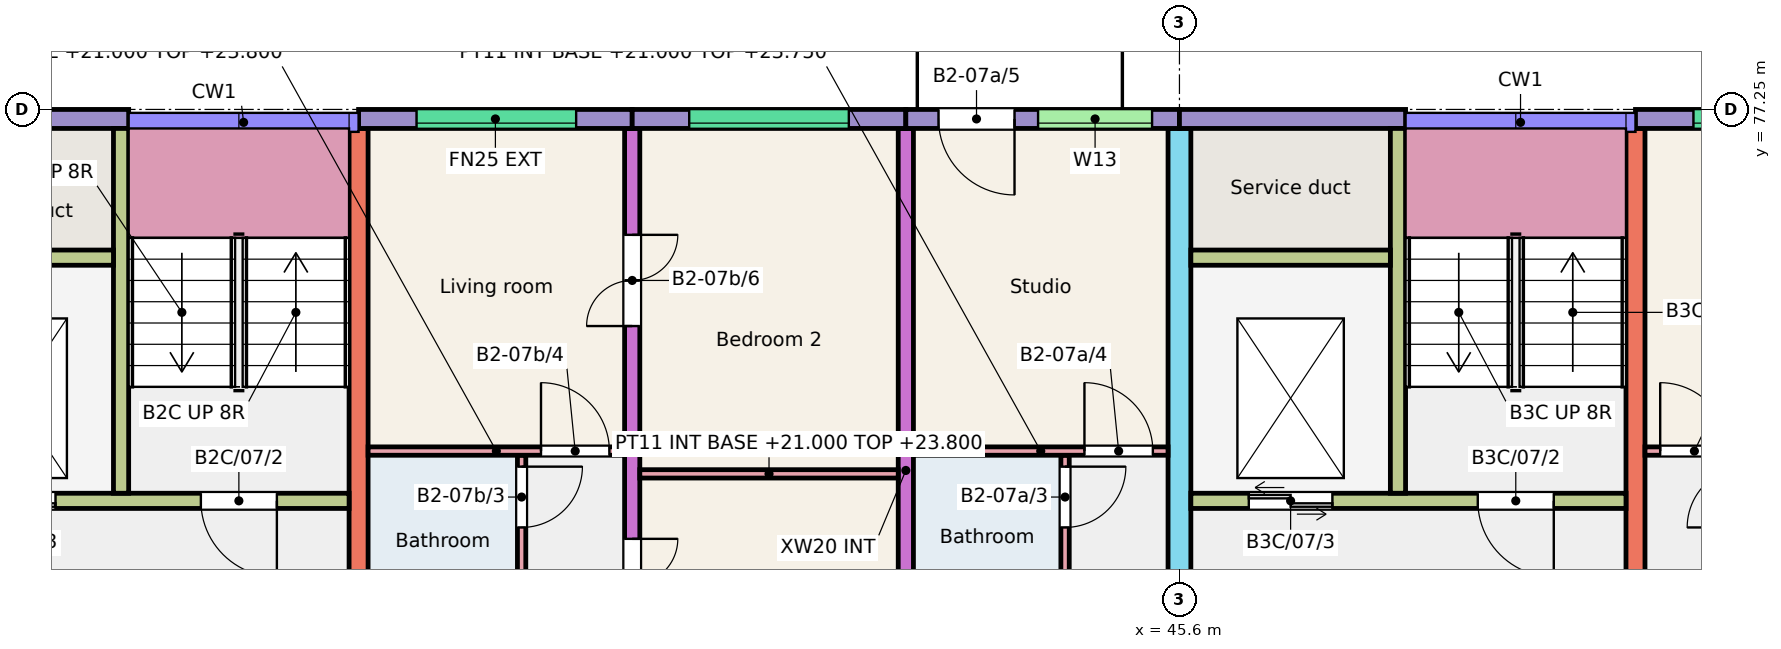
"""IFC4 building model, lengths in metres.
Left out: names, types, materials, properties, quantities, classifications, styles, units other than length and angle.
Written with IfcOpenShell. Run it as: python <this file> out.ifc"""

import sys

from ifc_helpers import new_model, si_unit, direction, frame, frame_2d, origin, place, context, subcontext, project, spatial, rectangle, extrude, element, fill, save


model = new_model("IFC4")
c1 = context("Model", 3, precision=1e-05, world=origin(), true_north=direction((0.0, 1.0)))
c2 = subcontext(c1, "Body", "Model", "MODEL_VIEW")
j1 = project(units=[si_unit("LENGTHUNIT", "METRE"), si_unit("PLANEANGLEUNIT", "RADIAN")], contexts=[c1])
p1 = place(None, origin())
s1 = spatial("IfcSite", under=j1, at=p1, CompositionType="ELEMENT")
p2 = place(p1, origin())
s2 = spatial("IfcBuilding", under=s1, at=p2, CompositionType="ELEMENT")
p3 = place(p2, frame((0.0, 0.0, 21.0)))
s3 = spatial("IfcBuildingStorey", under=s2, at=p3, CompositionType="ELEMENT", Elevation=21.0)
p4 = place(p3, frame((34.8, 68.0, 0.0), z_axis=(0.0, 0.0, 1.0), x_axis=(0.0, 1.0, 0.0)))
e1 = element("IfcWall", 1, at=p4, inside=s3, PredefinedType="SHEAR", context=c2, shape_type="SweptSolid", body=[
    extrude(rectangle(XDim=9.0, YDim=0.25, at=frame_2d((4.5, 0.0))), origin(), (0.0, 0.0, 1.0), 3.0),
])
p5 = place(p3, frame((38.4, 68.0, 0.0), z_axis=(0.0, 0.0, 1.0), x_axis=(0.0, 1.0, 0.0)))
e2 = element("IfcWall", 2, at=p5, inside=s3, PredefinedType="SHEAR", context=c2, shape_type="SweptSolid", body=[
    extrude(rectangle(XDim=9.0, YDim=0.2, at=frame_2d((4.5, 0.0))), origin(), (0.0, 0.0, 1.0), 3.0),
])
p6 = place(p5, frame((2.4, 0.0, 0.0)))
e3 = element("IfcOpeningElement", 3, at=p6, cuts=e2, PredefinedType="OPENING", context=c2, shape_type="SweptSolid", body=[
    extrude(rectangle(XDim=1.2, YDim=2.1, at=frame_2d((0.6, 1.05))), frame((0.0, 0.11, 0.0), z_axis=(0.0, -1.0, 0.0), x_axis=(1.0, 0.0, 0.0)), (0.0, 0.0, 1.0), 0.22),
])
p7 = place(p5, frame((6.4, 0.0, 0.0)))
e4 = element("IfcOpeningElement", 4, at=p7, cuts=e2, PredefinedType="OPENING", context=c2, shape_type="SweptSolid", body=[
    extrude(rectangle(XDim=1.2, YDim=2.1, at=frame_2d((0.6, 1.05))), frame((0.0, 0.11, 0.0), z_axis=(0.0, -1.0, 0.0), x_axis=(1.0, 0.0, 0.0)), (0.0, 0.0, 1.0), 0.22),
])
p8 = place(p3, frame((42.0, 68.0, 0.0), z_axis=(0.0, 0.0, 1.0), x_axis=(0.0, 1.0, 0.0)))
e5 = element("IfcWall", 5, at=p8, inside=s3, PredefinedType="SHEAR", context=c2, shape_type="SweptSolid", body=[
    extrude(rectangle(XDim=9.0, YDim=0.2, at=frame_2d((4.5, 0.0))), origin(), (0.0, 0.0, 1.0), 3.0),
])
p9 = place(p3, frame((45.6, 66.0, 0.0), z_axis=(0.0, 0.0, 1.0), x_axis=(0.0, 1.0, 0.0)))
e6 = element("IfcWall", 6, at=p9, inside=s3, PredefinedType="SHEAR", context=c2, shape_type="SweptSolid", body=[
    extrude(rectangle(XDim=11.0, YDim=0.3, at=frame_2d((5.5, 0.0))), origin(), (0.0, 0.0, 1.0), 3.0),
])
p10 = place(p9, frame((0.3, 0.0, 0.0)))
e7 = element("IfcOpeningElement", 7, at=p10, cuts=e6, PredefinedType="OPENING", context=c2, shape_type="SweptSolid", body=[
    extrude(rectangle(XDim=1.2, YDim=2.1, at=frame_2d((0.6, 1.05))), frame((0.0, 0.16, 0.0), z_axis=(0.0, -1.0, 0.0), x_axis=(1.0, 0.0, 0.0)), (0.0, 0.0, 1.0), 0.32),
])
p11 = place(p3, frame((51.6, 68.0, 0.0), z_axis=(0.0, 0.0, 1.0), x_axis=(0.0, 1.0, 0.0)))
e8 = element("IfcWall", 8, at=p11, inside=s3, PredefinedType="SHEAR", context=c2, shape_type="SweptSolid", body=[
    extrude(rectangle(XDim=9.0, YDim=0.25, at=frame_2d((4.5, 0.0))), origin(), (0.0, 0.0, 1.0), 3.0),
])
p12 = place(p3, frame((28.8, 77.125, 0.0), z_axis=(0.0, 0.0, 1.0), x_axis=(1.0, 0.0, 0.0)))
e9 = element("IfcWall", 9, at=p12, inside=s3, PredefinedType="SOLIDWALL", context=c2, shape_type="SweptSolid", body=[
    extrude(rectangle(XDim=2.975, YDim=0.25, at=frame_2d((1.487, 0.0))), origin(), (0.0, 0.0, 1.0), 3.0),
])
p13 = place(p3, frame((28.95, 72.1, 0.0), z_axis=(0.0, 0.0, 1.0), x_axis=(1.0, 0.0, 0.0)))
e10 = element("IfcWall", 10, at=p13, inside=s3, PredefinedType="SHEAR", context=c2, shape_type="SweptSolid", body=[
    extrude(rectangle(XDim=5.725, YDim=0.2, at=frame_2d((2.863, 0.0))), origin(), (0.0, 0.0, 1.0), 3.0),
])
p14 = place(p13, frame((3.775, 0.0, 0.0)))
e11 = element("IfcOpeningElement", 11, at=p14, cuts=e10, PredefinedType="OPENING", context=c2, shape_type="SweptSolid", body=[
    extrude(rectangle(XDim=1.0, YDim=2.1, at=frame_2d((0.5, 1.05))), frame((0.0, 0.11, 0.0), z_axis=(0.0, -1.0, 0.0), x_axis=(1.0, 0.0, 0.0)), (0.0, 0.0, 1.0), 0.22),
])
p15 = place(p13, frame((0.762, 0.0, 0.0)))
e12 = element("IfcOpeningElement", 12, at=p15, cuts=e10, PredefinedType="OPENING", context=c2, shape_type="SweptSolid", body=[
    extrude(rectangle(XDim=1.1, YDim=2.1, at=frame_2d((0.55, 1.05))), frame((0.0, 0.11, 0.0), z_axis=(0.0, -1.0, 0.0), x_axis=(1.0, 0.0, 0.0)), (0.0, 0.0, 1.0), 0.22),
])
p16 = place(p3, frame((31.675, 72.2, 0.0), z_axis=(0.0, 0.0, 1.0), x_axis=(0.0, 1.0, 0.0)))
e13 = element("IfcWall", 13, at=p16, inside=s3, PredefinedType="SHEAR", context=c2, shape_type="SweptSolid", body=[
    extrude(rectangle(XDim=4.8, YDim=0.2, at=frame_2d((2.4, 0.0))), origin(), (0.0, 0.0, 1.0), 3.0),
])
p17 = place(p3, frame((28.95, 75.3, 0.0), z_axis=(0.0, 0.0, 1.0), x_axis=(1.0, 0.0, 0.0)))
e14 = element("IfcWall", 14, at=p17, inside=s3, PredefinedType="SHEAR", context=c2, shape_type="SweptSolid", body=[
    extrude(rectangle(XDim=2.625, YDim=0.2, at=frame_2d((1.312, 0.0))), origin(), (0.0, 0.0, 1.0), 3.0),
])
p18 = place(p3, frame((34.8, 77.125, 0.0), z_axis=(0.0, 0.0, 1.0), x_axis=(1.0, 0.0, 0.0)))
e15 = element("IfcWall", 15, at=p18, inside=s3, PredefinedType="SOLIDWALL", context=c2, shape_type="SweptSolid", body=[
    extrude(rectangle(XDim=3.6, YDim=0.25, at=frame_2d((1.8, 0.0))), origin(), (0.0, 0.0, 1.0), 3.0),
])
p19 = place(p18, frame((0.762, 0.0, 1.2)))
e16 = element("IfcOpeningElement", 16, at=p19, cuts=e15, PredefinedType="OPENING", context=c2, shape_type="SweptSolid", body=[
    extrude(rectangle(XDim=2.1, YDim=1.2, at=frame_2d((1.05, 0.6))), frame((0.0, 0.135, 0.0), z_axis=(0.0, -1.0, 0.0), x_axis=(1.0, 0.0, 0.0)), (0.0, 0.0, 1.0), 0.27),
])
p20 = place(p3, frame((38.4, 77.125, 0.0), z_axis=(0.0, 0.0, 1.0), x_axis=(1.0, 0.0, 0.0)))
e17 = element("IfcWall", 17, at=p20, inside=s3, PredefinedType="SOLIDWALL", context=c2, shape_type="SweptSolid", body=[
    extrude(rectangle(XDim=3.6, YDim=0.25, at=frame_2d((1.8, 0.0))), origin(), (0.0, 0.0, 1.0), 3.0),
])
p21 = place(p20, frame((0.75, 0.0, 1.2)))
e18 = element("IfcOpeningElement", 18, at=p21, cuts=e17, PredefinedType="OPENING", context=c2, shape_type="SweptSolid", body=[
    extrude(rectangle(XDim=2.1, YDim=1.2, at=frame_2d((1.05, 0.6))), frame((0.0, 0.135, 0.0), z_axis=(0.0, -1.0, 0.0), x_axis=(1.0, 0.0, 0.0)), (0.0, 0.0, 1.0), 0.27),
])
p22 = place(p3, frame((42.0, 77.125, 0.0), z_axis=(0.0, 0.0, 1.0), x_axis=(1.0, 0.0, 0.0)))
e19 = element("IfcWall", 19, at=p22, inside=s3, PredefinedType="SOLIDWALL", context=c2, shape_type="SweptSolid", body=[
    extrude(rectangle(XDim=3.6, YDim=0.25, at=frame_2d((1.8, 0.0))), origin(), (0.0, 0.0, 1.0), 3.0),
])
p23 = place(p22, frame((1.74, 0.0, 1.2)))
e20 = element("IfcOpeningElement", 20, at=p23, cuts=e19, PredefinedType="OPENING", context=c2, shape_type="SweptSolid", body=[
    extrude(rectangle(XDim=1.5, YDim=1.2, at=frame_2d((0.75, 0.6))), frame((0.0, 0.135, 0.0), z_axis=(0.0, -1.0, 0.0), x_axis=(1.0, 0.0, 0.0)), (0.0, 0.0, 1.0), 0.27),
])
p24 = place(p22, frame((0.43, 0.0, 0.0)))
e21 = element("IfcOpeningElement", 21, at=p24, cuts=e19, PredefinedType="OPENING", context=c2, shape_type="SweptSolid", body=[
    extrude(rectangle(XDim=1.0, YDim=2.1, at=frame_2d((0.5, 1.05))), frame((0.0, 0.135, 0.0), z_axis=(0.0, -1.0, 0.0), x_axis=(1.0, 0.0, 0.0)), (0.0, 0.0, 1.0), 0.27),
])
p25 = place(p3, frame((45.6, 77.125, 0.0), z_axis=(0.0, 0.0, 1.0), x_axis=(1.0, 0.0, 0.0)))
e22 = element("IfcWall", 22, at=p25, inside=s3, PredefinedType="SOLIDWALL", context=c2, shape_type="SweptSolid", body=[
    extrude(rectangle(XDim=2.975, YDim=0.25, at=frame_2d((1.487, 0.0))), origin(), (0.0, 0.0, 1.0), 3.0),
])
p26 = place(p3, frame((45.75, 72.1, 0.0), z_axis=(0.0, 0.0, 1.0), x_axis=(1.0, 0.0, 0.0)))
e23 = element("IfcWall", 23, at=p26, inside=s3, PredefinedType="SHEAR", context=c2, shape_type="SweptSolid", body=[
    extrude(rectangle(XDim=5.725, YDim=0.2, at=frame_2d((2.863, 0.0))), origin(), (0.0, 0.0, 1.0), 3.0),
])
p27 = place(p26, frame((3.775, 0.0, 0.0)))
e24 = element("IfcOpeningElement", 24, at=p27, cuts=e23, PredefinedType="OPENING", context=c2, shape_type="SweptSolid", body=[
    extrude(rectangle(XDim=1.0, YDim=2.1, at=frame_2d((0.5, 1.05))), frame((0.0, 0.11, 0.0), z_axis=(0.0, -1.0, 0.0), x_axis=(1.0, 0.0, 0.0)), (0.0, 0.0, 1.0), 0.22),
])
p28 = place(p26, frame((0.762, 0.0, 0.0)))
e25 = element("IfcOpeningElement", 25, at=p28, cuts=e23, PredefinedType="OPENING", context=c2, shape_type="SweptSolid", body=[
    extrude(rectangle(XDim=1.1, YDim=2.1, at=frame_2d((0.55, 1.05))), frame((0.0, 0.11, 0.0), z_axis=(0.0, -1.0, 0.0), x_axis=(1.0, 0.0, 0.0)), (0.0, 0.0, 1.0), 0.22),
])
p29 = place(p3, frame((48.475, 72.2, 0.0), z_axis=(0.0, 0.0, 1.0), x_axis=(0.0, 1.0, 0.0)))
e26 = element("IfcWall", 26, at=p29, inside=s3, PredefinedType="SHEAR", context=c2, shape_type="SweptSolid", body=[
    extrude(rectangle(XDim=4.8, YDim=0.2, at=frame_2d((2.4, 0.0))), origin(), (0.0, 0.0, 1.0), 3.0),
])
p30 = place(p3, frame((45.75, 75.3, 0.0), z_axis=(0.0, 0.0, 1.0), x_axis=(1.0, 0.0, 0.0)))
e27 = element("IfcWall", 27, at=p30, inside=s3, PredefinedType="SHEAR", context=c2, shape_type="SweptSolid", body=[
    extrude(rectangle(XDim=2.625, YDim=0.2, at=frame_2d((1.312, 0.0))), origin(), (0.0, 0.0, 1.0), 3.0),
])
p31 = place(p3, frame((51.6, 77.125, 0.0), z_axis=(0.0, 0.0, 1.0), x_axis=(1.0, 0.0, 0.0)))
e28 = element("IfcWall", 28, at=p31, inside=s3, PredefinedType="SOLIDWALL", context=c2, shape_type="SweptSolid", body=[
    extrude(rectangle(XDim=3.6, YDim=0.25, at=frame_2d((1.8, 0.0))), origin(), (0.0, 0.0, 1.0), 3.0),
])
p32 = place(p31, frame((0.762, 0.0, 1.2)))
e29 = element("IfcOpeningElement", 29, at=p32, cuts=e28, PredefinedType="OPENING", context=c2, shape_type="SweptSolid", body=[
    extrude(rectangle(XDim=2.1, YDim=1.2, at=frame_2d((1.05, 0.6))), frame((0.0, 0.135, 0.0), z_axis=(0.0, -1.0, 0.0), x_axis=(1.0, 0.0, 0.0)), (0.0, 0.0, 1.0), 0.27),
])
p33 = place(p3, frame((44.095, 68.0, 0.0), z_axis=(0.0, 0.0, 1.0), x_axis=(0.0, 1.0, 0.0)))
e30 = element("IfcWall", 30, at=p33, inside=s3, PredefinedType="PARTITIONING", context=c2, shape_type="SweptSolid", body=[
    extrude(rectangle(XDim=4.7, YDim=0.11, at=frame_2d((2.35, 0.0))), origin(), (0.0, 0.0, 1.0), 2.75),
])
p34 = place(p33, frame((0.2, 0.0, 0.0)))
e31 = element("IfcOpeningElement", 31, at=p34, cuts=e30, PredefinedType="OPENING", context=c2, shape_type="SweptSolid", body=[
    extrude(rectangle(XDim=0.8, YDim=2.1, at=frame_2d((0.4, 1.05))), frame((0.0, 0.065, 0.0), z_axis=(0.0, -1.0, 0.0), x_axis=(1.0, 0.0, 0.0)), (0.0, 0.0, 1.0), 0.13),
])
p35 = place(p33, frame((3.75, 0.0, 0.0)))
e32 = element("IfcOpeningElement", 32, at=p35, cuts=e30, PredefinedType="OPENING", context=c2, shape_type="SweptSolid", body=[
    extrude(rectangle(XDim=0.8, YDim=2.1, at=frame_2d((0.4, 1.05))), frame((0.0, 0.065, 0.0), z_axis=(0.0, -1.0, 0.0), x_axis=(1.0, 0.0, 0.0)), (0.0, 0.0, 1.0), 0.13),
])
p36 = place(p3, frame((42.1, 72.755, 0.0), z_axis=(0.0, 0.0, 1.0), x_axis=(1.0, 0.0, 0.0)))
e33 = element("IfcWall", 33, at=p36, inside=s3, PredefinedType="PARTITIONING", context=c2, shape_type="SweptSolid", body=[
    extrude(rectangle(XDim=3.35, YDim=0.11, at=frame_2d((1.675, 0.0))), origin(), (0.0, 0.0, 1.0), 2.75),
])
p37 = place(p36, frame((2.25, 0.0, 0.0)))
e34 = element("IfcOpeningElement", 34, at=p37, cuts=e33, PredefinedType="OPENING", context=c2, shape_type="SweptSolid", body=[
    extrude(rectangle(XDim=0.9, YDim=2.1, at=frame_2d((0.45, 1.05))), frame((0.0, 0.065, 0.0), z_axis=(0.0, -1.0, 0.0), x_axis=(1.0, 0.0, 0.0)), (0.0, 0.0, 1.0), 0.13),
])
p38 = place(p3, frame((36.945, 68.0, 0.0), z_axis=(0.0, 0.0, 1.0), x_axis=(0.0, 1.0, 0.0)))
e35 = element("IfcWall", 35, at=p38, inside=s3, PredefinedType="PARTITIONING", context=c2, shape_type="SweptSolid", body=[
    extrude(rectangle(XDim=4.7, YDim=0.11, at=frame_2d((2.35, 0.0))), origin(), (0.0, 0.0, 1.0), 2.8),
])
p39 = place(p38, frame((0.2, 0.0, 0.0)))
e36 = element("IfcOpeningElement", 36, at=p39, cuts=e35, PredefinedType="OPENING", context=c2, shape_type="SweptSolid", body=[
    extrude(rectangle(XDim=0.8, YDim=2.1, at=frame_2d((0.4, 1.05))), frame((0.0, 0.065, 0.0), z_axis=(0.0, -1.0, 0.0), x_axis=(1.0, 0.0, 0.0)), (0.0, 0.0, 1.0), 0.13),
])
p40 = place(p38, frame((3.75, 0.0, 0.0)))
e37 = element("IfcOpeningElement", 37, at=p40, cuts=e35, PredefinedType="OPENING", context=c2, shape_type="SweptSolid", body=[
    extrude(rectangle(XDim=0.8, YDim=2.1, at=frame_2d((0.4, 1.05))), frame((0.0, 0.065, 0.0), z_axis=(0.0, -1.0, 0.0), x_axis=(1.0, 0.0, 0.0)), (0.0, 0.0, 1.0), 0.13),
])
p41 = place(p3, frame((34.925, 72.755, 0.0), z_axis=(0.0, 0.0, 1.0), x_axis=(1.0, 0.0, 0.0)))
e38 = element("IfcWall", 38, at=p41, inside=s3, PredefinedType="PARTITIONING", context=c2, shape_type="SweptSolid", body=[
    extrude(rectangle(XDim=3.375, YDim=0.11, at=frame_2d((1.688, 0.0))), origin(), (0.0, 0.0, 1.0), 2.8),
])
p42 = place(p41, frame((2.275, 0.0, 0.0)))
e39 = element("IfcOpeningElement", 39, at=p42, cuts=e38, PredefinedType="OPENING", context=c2, shape_type="SweptSolid", body=[
    extrude(rectangle(XDim=0.9, YDim=2.1, at=frame_2d((0.45, 1.05))), frame((0.0, 0.065, 0.0), z_axis=(0.0, -1.0, 0.0), x_axis=(1.0, 0.0, 0.0)), (0.0, 0.0, 1.0), 0.13),
])
p43 = place(p3, frame((38.5, 72.455, 0.0), z_axis=(0.0, 0.0, 1.0), x_axis=(1.0, 0.0, 0.0)))
e40 = element("IfcWall", 40, at=p43, inside=s3, PredefinedType="PARTITIONING", context=c2, shape_type="SweptSolid", body=[
    extrude(rectangle(XDim=3.4, YDim=0.11, at=frame_2d((1.7, 0.0))), origin(), (0.0, 0.0, 1.0), 2.8),
])
p44 = place(p3, frame((51.725, 72.755, 0.0), z_axis=(0.0, 0.0, 1.0), x_axis=(1.0, 0.0, 0.0)))
e41 = element("IfcWall", 41, at=p44, inside=s3, PredefinedType="PARTITIONING", context=c2, shape_type="SweptSolid", body=[
    extrude(rectangle(XDim=3.375, YDim=0.11, at=frame_2d((1.688, 0.0))), origin(), (0.0, 0.0, 1.0), 2.75),
])
p45 = place(p44, frame((0.2, 0.0, 0.0)))
e42 = element("IfcOpeningElement", 42, at=p45, cuts=e41, PredefinedType="OPENING", context=c2, shape_type="SweptSolid", body=[
    extrude(rectangle(XDim=0.9, YDim=2.1, at=frame_2d((0.45, 1.05))), frame((0.0, 0.065, 0.0), z_axis=(0.0, -1.0, 0.0), x_axis=(1.0, 0.0, 0.0)), (0.0, 0.0, 1.0), 0.13),
])
p46 = place(p23, origin())
e43 = element("IfcWindow", 43, at=p46, inside=s3, PartitioningType="SINGLE_PANEL", PredefinedType="WINDOW", context=c2, shape_type="SweptSolid", body=[
    extrude(rectangle(XDim=1.5, YDim=1.2, at=frame_2d((0.75, 0.6))), frame((0.0, -0.025, 0.0), z_axis=(0.0, -1.0, 0.0), x_axis=(1.0, 0.0, 0.0)), (0.0, 0.0, 1.0), 0.06),
])
fill(e20, e43)
p47 = place(p21, origin())
e44 = element("IfcWindow", 44, at=p47, inside=s3, PartitioningType="SINGLE_PANEL", PredefinedType="WINDOW", context=c2, shape_type="SweptSolid", body=[
    extrude(rectangle(XDim=2.1, YDim=1.2, at=frame_2d((1.05, 0.6))), frame((0.0, -0.025, 0.0), z_axis=(0.0, -1.0, 0.0), x_axis=(1.0, 0.0, 0.0)), (0.0, 0.0, 1.0), 0.06),
])
fill(e18, e44)
p48 = place(p19, origin())
e45 = element("IfcWindow", 45, at=p48, inside=s3, PartitioningType="SINGLE_PANEL", PredefinedType="WINDOW", context=c2, shape_type="SweptSolid", body=[
    extrude(rectangle(XDim=2.1, YDim=1.2, at=frame_2d((1.05, 0.6))), frame((0.0, -0.025, 0.0), z_axis=(0.0, -1.0, 0.0), x_axis=(1.0, 0.0, 0.0)), (0.0, 0.0, 1.0), 0.06),
])
fill(e16, e45)
p49 = place(p32, origin())
e46 = element("IfcWindow", 46, at=p49, inside=s3, PartitioningType="SINGLE_PANEL", PredefinedType="WINDOW", context=c2, shape_type="SweptSolid", body=[
    extrude(rectangle(XDim=2.1, YDim=1.2, at=frame_2d((1.05, 0.6))), frame((0.0, -0.025, 0.0), z_axis=(0.0, -1.0, 0.0), x_axis=(1.0, 0.0, 0.0)), (0.0, 0.0, 1.0), 0.06),
])
fill(e29, e46)
p50 = place(p35, origin())
e47 = element("IfcDoor", 47, at=p50, inside=s3, OperationType="SINGLE_SWING_RIGHT", PredefinedType="DOOR", context=c2, shape_type="SweptSolid", body=[
    extrude(rectangle(XDim=0.8, YDim=2.1, at=frame_2d((0.4, 1.05))), frame((0.0, 0.025, 0.0), z_axis=(0.0, -1.0, 0.0), x_axis=(1.0, 0.0, 0.0)), (0.0, 0.0, 1.0), 0.05),
])
fill(e32, e47)
p51 = place(p37, origin())
e48 = element("IfcDoor", 48, at=p51, inside=s3, OperationType="SINGLE_SWING_LEFT", PredefinedType="DOOR", context=c2, shape_type="SweptSolid", body=[
    extrude(rectangle(XDim=0.9, YDim=2.1, at=frame_2d((0.45, 1.05))), frame((0.0, 0.025, 0.0), z_axis=(0.0, -1.0, 0.0), x_axis=(1.0, 0.0, 0.0)), (0.0, 0.0, 1.0), 0.05),
])
fill(e34, e48)
p52 = place(p24, origin())
e49 = element("IfcDoor", 49, at=p52, inside=s3, OperationType="SINGLE_SWING_RIGHT", PredefinedType="DOOR", context=c2, shape_type="SweptSolid", body=[
    extrude(rectangle(XDim=1.0, YDim=2.1, at=frame_2d((0.5, 1.05))), frame((0.0, 0.025, 0.0), z_axis=(0.0, -1.0, 0.0), x_axis=(1.0, 0.0, 0.0)), (0.0, 0.0, 1.0), 0.05),
])
fill(e21, e49)
p53 = place(p40, origin())
e50 = element("IfcDoor", 50, at=p53, inside=s3, OperationType="SINGLE_SWING_RIGHT", PredefinedType="DOOR", context=c2, shape_type="SweptSolid", body=[
    extrude(rectangle(XDim=0.8, YDim=2.1, at=frame_2d((0.4, 1.05))), frame((0.0, 0.025, 0.0), z_axis=(0.0, -1.0, 0.0), x_axis=(1.0, 0.0, 0.0)), (0.0, 0.0, 1.0), 0.05),
])
fill(e37, e50)
p54 = place(p42, origin())
e51 = element("IfcDoor", 51, at=p54, inside=s3, OperationType="SINGLE_SWING_LEFT", PredefinedType="DOOR", context=c2, shape_type="SweptSolid", body=[
    extrude(rectangle(XDim=0.9, YDim=2.1, at=frame_2d((0.45, 1.05))), frame((0.0, 0.025, 0.0), z_axis=(0.0, -1.0, 0.0), x_axis=(1.0, 0.0, 0.0)), (0.0, 0.0, 1.0), 0.05),
])
fill(e39, e51)
p55 = place(p6, origin())
e52 = element("IfcDoor", 52, at=p55, inside=s3, OperationType="DOUBLE_DOOR_SINGLE_SWING", PredefinedType="DOOR", context=c2, shape_type="SweptSolid", body=[
    extrude(rectangle(XDim=1.2, YDim=2.1, at=frame_2d((0.6, 1.05))), frame((0.0, 0.025, 0.0), z_axis=(0.0, -1.0, 0.0), x_axis=(1.0, 0.0, 0.0)), (0.0, 0.0, 1.0), 0.05),
])
fill(e3, e52)
p56 = place(p7, origin())
e53 = element("IfcDoor", 53, at=p56, inside=s3, OperationType="DOUBLE_DOOR_SINGLE_SWING", PredefinedType="DOOR", context=c2, shape_type="SweptSolid", body=[
    extrude(rectangle(XDim=1.2, YDim=2.1, at=frame_2d((0.6, 1.05))), frame((0.0, 0.025, 0.0), z_axis=(0.0, -1.0, 0.0), x_axis=(1.0, 0.0, 0.0)), (0.0, 0.0, 1.0), 0.05),
])
fill(e4, e53)
p57 = place(p45, origin())
e54 = element("IfcDoor", 54, at=p57, inside=s3, OperationType="SINGLE_SWING_LEFT", PredefinedType="DOOR", context=c2, shape_type="SweptSolid", body=[
    extrude(rectangle(XDim=0.9, YDim=2.1, at=frame_2d((0.45, 1.05))), frame((0.0, 0.025, 0.0), z_axis=(0.0, -1.0, 0.0), x_axis=(1.0, 0.0, 0.0)), (0.0, 0.0, 1.0), 0.05),
])
fill(e42, e54)
p58 = place(p14, origin())
e55 = element("IfcDoor", 55, at=p58, inside=s3, OperationType="SINGLE_SWING_RIGHT", PredefinedType="DOOR", context=c2, shape_type="SweptSolid", body=[
    extrude(rectangle(XDim=1.0, YDim=2.1, at=frame_2d((0.5, 1.05))), frame((0.0, 0.025, 0.0), z_axis=(0.0, -1.0, 0.0), x_axis=(1.0, 0.0, 0.0)), (0.0, 0.0, 1.0), 0.05),
])
fill(e11, e55)
p59 = place(p15, origin())
e56 = element("IfcDoor", 56, at=p59, inside=s3, OperationType="DOUBLE_DOOR_SLIDING", PredefinedType="DOOR", context=c2, shape_type="SweptSolid", body=[
    extrude(rectangle(XDim=1.1, YDim=2.1, at=frame_2d((0.55, 1.05))), frame((0.0, 0.025, 0.0), z_axis=(0.0, -1.0, 0.0), x_axis=(1.0, 0.0, 0.0)), (0.0, 0.0, 1.0), 0.05),
])
fill(e12, e56)
p60 = place(p27, origin())
e57 = element("IfcDoor", 57, at=p60, inside=s3, OperationType="SINGLE_SWING_RIGHT", PredefinedType="DOOR", context=c2, shape_type="SweptSolid", body=[
    extrude(rectangle(XDim=1.0, YDim=2.1, at=frame_2d((0.5, 1.05))), frame((0.0, 0.025, 0.0), z_axis=(0.0, -1.0, 0.0), x_axis=(1.0, 0.0, 0.0)), (0.0, 0.0, 1.0), 0.05),
])
fill(e24, e57)
p61 = place(p28, origin())
e58 = element("IfcDoor", 58, at=p61, inside=s3, OperationType="DOUBLE_DOOR_SLIDING", PredefinedType="DOOR", context=c2, shape_type="SweptSolid", body=[
    extrude(rectangle(XDim=1.1, YDim=2.1, at=frame_2d((0.55, 1.05))), frame((0.0, 0.025, 0.0), z_axis=(0.0, -1.0, 0.0), x_axis=(1.0, 0.0, 0.0)), (0.0, 0.0, 1.0), 0.05),
])
fill(e25, e58)
save(model, sys.argv[1])
